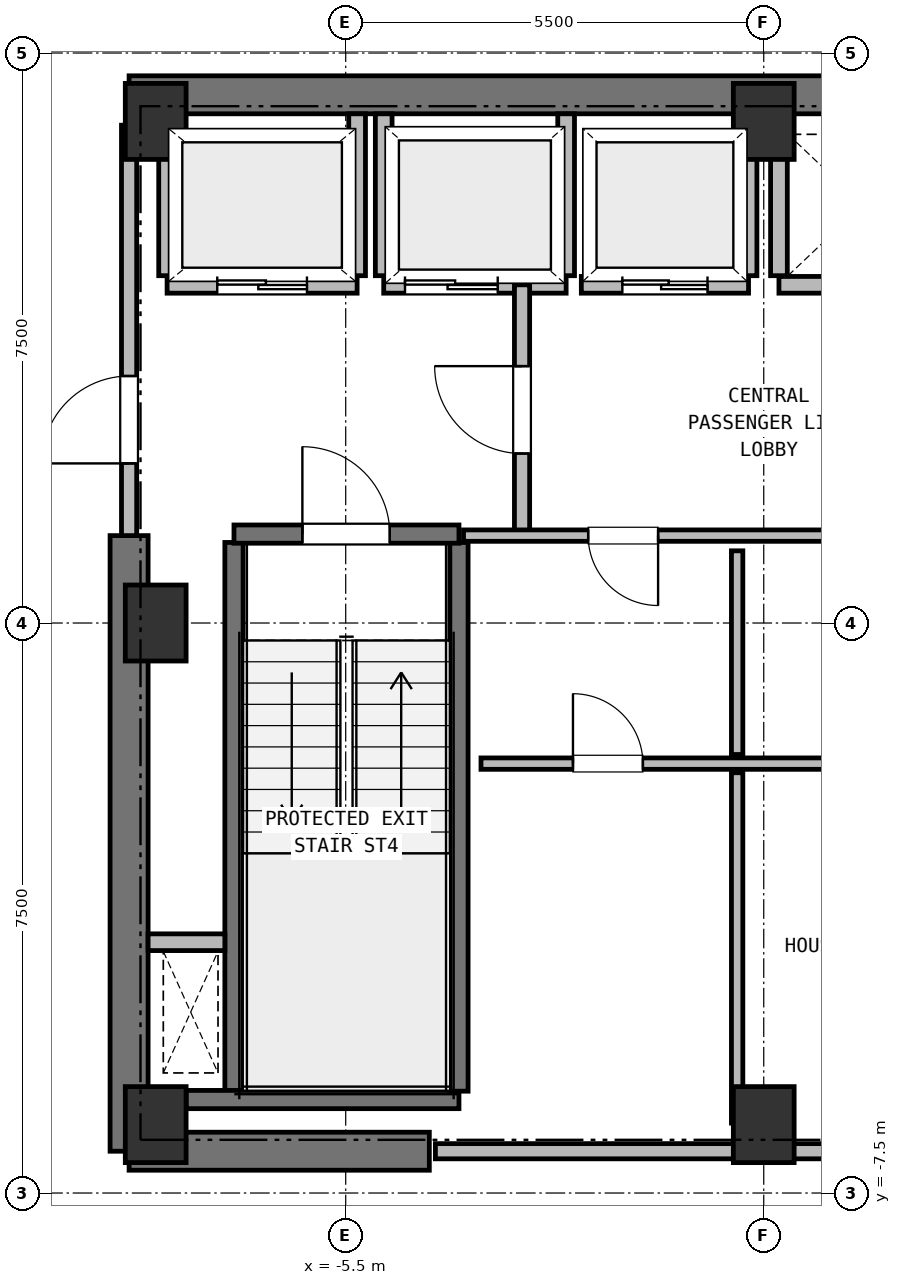
"""IFC4 building model, lengths in metres.
Left out: names, types, materials, properties, quantities, classifications, styles, units other than length and angle.
Written with IfcOpenShell. Run it as: python <this file> out.ifc"""

import sys

from ifc_helpers import new_model, si_unit, direction, frame, frame_2d, origin, origin_2d, place, context, subcontext, project, spatial, rectangle, extrude, element, fill, save


model = new_model("IFC4")
c1 = context("Model", 3, precision=1e-05, world=origin(), true_north=direction((0.0, 1.0)))
c2 = subcontext(c1, "Body", "Model", "MODEL_VIEW")
j1 = project(units=[si_unit("LENGTHUNIT", "METRE"), si_unit("PLANEANGLEUNIT", "RADIAN")], contexts=[c1])
p1 = place(None, origin())
s1 = spatial("IfcSite", under=j1, at=p1, CompositionType="ELEMENT")
p2 = place(p1, origin())
s2 = spatial("IfcBuilding", under=s1, at=p2, CompositionType="ELEMENT")
p3 = place(p2, frame((0.0, 0.0, 228.35)))
s3 = spatial("IfcBuildingStorey", under=s2, at=p3, CompositionType="ELEMENT", Elevation=228.35)
for number, where, z_axis, x_axis in (
    (1, (-8.0, -6.6, 0.0), (0.0, 0.0, 1.0), (1.0, 0.0, 0.0)),
    (2, (0.0, -6.6, 0.0), (0.0, 0.0, 1.0), (1.0, 0.0, 0.0)),
    (3, (0.0, 6.6, 0.0), (0.0, 0.0, 1.0), (1.0, 0.0, 0.0)),
    (4, (-8.0, 6.6, 0.0), (0.0, 0.0, 1.0), (1.0, 0.0, 0.0)),
    (5, (-8.0, 0.0, 0.0), (0.0, 0.0, 1.0), (1.0, 0.0, 0.0)),
):
    element("IfcColumn", number, at=place(p3, frame(where, z_axis=z_axis, x_axis=x_axis)), inside=s3, PredefinedType="COLUMN", context=c2, shape_type="SweptSolid", body=[
        extrude(rectangle(XDim=0.8, YDim=1.0, at=origin_2d()), origin(), (0.0, 0.0, 1.0), 3.8),
    ])
p4 = place(p3, frame((-8.35, 6.95, 0.0), z_axis=(0.0, 0.0, 1.0), x_axis=(1.0, 0.0, 0.0)))
e6 = element("IfcWall", 6, at=p4, inside=s3, PredefinedType="SHEAR", context=c2, shape_type="SweptSolid", body=[
    extrude(rectangle(XDim=16.7, YDim=0.5, at=frame_2d((8.35, 0.0))), origin(), (0.0, 0.0, 1.0), 3.55),
])
p5 = place(p3, frame((-8.35, -6.95, 0.0), z_axis=(0.0, 0.0, 1.0), x_axis=(1.0, 0.0, 0.0)))
e7 = element("IfcWall", 7, at=p5, inside=s3, PredefinedType="SHEAR", context=c2, shape_type="SweptSolid", body=[
    extrude(rectangle(XDim=3.95, YDim=0.5, at=frame_2d((1.975, 0.0))), origin(), (0.0, 0.0, 1.0), 3.55),
])
p6 = place(p3, frame((-8.35, -6.95, 0.0), z_axis=(0.0, 0.0, 1.0), x_axis=(0.0, 1.0, 0.0)))
e8 = element("IfcWall", 8, at=p6, inside=s3, PredefinedType="SHEAR", context=c2, shape_type="SweptSolid", body=[
    extrude(rectangle(XDim=8.1, YDim=0.5, at=frame_2d((4.05, 0.0))), origin(), (0.0, 0.0, 1.0), 3.55),
])
p7 = place(p3, frame((-8.102, -11.696, 0.0), z_axis=(0.0, 0.0, 1.0), x_axis=(-0.587801006747, 0.809005547859, 0.0)))
e9 = element("IfcWall", 9, at=p7, inside=s3, PredefinedType="SOLIDWALL", context=c2, shape_type="SweptSolid", body=[
    extrude(rectangle(XDim=9.4, YDim=0.36, at=frame_2d((4.7, 0.0))), origin(), (0.0, 0.0, 1.0), 3.23),
])
p8 = place(p7, frame((3.0, 0.0, 0.0)))
e10 = element("IfcOpeningElement", 10, at=p8, cuts=e9, PredefinedType="OPENING", context=c2, shape_type="SweptSolid", body=[
    extrude(rectangle(XDim=1.65, YDim=2.25, at=frame_2d((0.825, 1.125))), frame((0.0, 0.19, 0.0), z_axis=(0.0, -1.0, 0.0), x_axis=(1.0, 0.0, 0.0)), (0.0, 0.0, 1.0), 0.38),
])
p9 = place(p3, frame((-6.97, -6.16, 0.0), z_axis=(0.0, 0.0, 1.0), x_axis=(0.0, 1.0, 0.0)))
e11 = element("IfcWall", 11, at=p9, inside=s3, PredefinedType="SHEAR", context=c2, shape_type="SweptSolid", body=[
    extrude(rectangle(XDim=7.22, YDim=0.24, at=frame_2d((3.61, 0.0))), origin(), (0.0, 0.0, 1.0), 3.55),
])
p10 = place(p3, frame((-7.6, -6.27, 0.0), z_axis=(0.0, 0.0, 1.0), x_axis=(1.0, 0.0, 0.0)))
e12 = element("IfcWall", 12, at=p10, inside=s3, PredefinedType="SHEAR", context=c2, shape_type="SweptSolid", body=[
    extrude(rectangle(XDim=3.59, YDim=0.24, at=frame_2d((1.795, 0.0))), origin(), (0.0, 0.0, 1.0), 3.55),
])
p11 = place(p3, frame((-4.01, -6.16, 0.0), z_axis=(0.0, 0.0, 1.0), x_axis=(0.0, 1.0, 0.0)))
e13 = element("IfcWall", 13, at=p11, inside=s3, PredefinedType="SHEAR", context=c2, shape_type="SweptSolid", body=[
    extrude(rectangle(XDim=7.22, YDim=0.24, at=frame_2d((3.61, 0.0))), origin(), (0.0, 0.0, 1.0), 3.55),
])
p12 = place(p3, frame((-6.97, 1.17, 0.0), z_axis=(0.0, 0.0, 1.0), x_axis=(1.0, 0.0, 0.0)))
e14 = element("IfcWall", 14, at=p12, inside=s3, PredefinedType="SHEAR", context=c2, shape_type="SweptSolid", body=[
    extrude(rectangle(XDim=2.96, YDim=0.24, at=frame_2d((1.48, 0.0))), origin(), (0.0, 0.0, 1.0), 3.55),
])
p13 = place(p12, frame((0.9, 0.0, 0.0)))
e15 = element("IfcOpeningElement", 15, at=p13, cuts=e14, PredefinedType="OPENING", context=c2, shape_type="SweptSolid", body=[
    extrude(rectangle(XDim=1.15, YDim=2.15, at=frame_2d((0.575, 1.075))), frame((0.0, 0.13, 0.0), z_axis=(0.0, -1.0, 0.0), x_axis=(1.0, 0.0, 0.0)), (0.0, 0.0, 1.0), 0.26),
])
p14 = place(p3, frame((-8.1, -4.2, 0.0), z_axis=(0.0, 0.0, 1.0), x_axis=(1.0, 0.0, 0.0)))
e16 = element("IfcWall", 16, at=p14, inside=s3, PredefinedType="PARTITIONING", context=c2, shape_type="SweptSolid", body=[
    extrude(rectangle(XDim=1.01, YDim=0.22, at=frame_2d((0.505, 0.0))), origin(), (0.0, 0.0, 1.0), 3.55),
])
p15 = place(p3, frame((-7.85, 4.45, 0.0), z_axis=(0.0, 0.0, 1.0), x_axis=(1.0, 0.0, 0.0)))
e17 = element("IfcWall", 17, at=p15, inside=s3, PredefinedType="PARTITIONING", context=c2, shape_type="SweptSolid", body=[
    extrude(rectangle(XDim=2.5, YDim=0.22, at=frame_2d((1.25, 0.0))), origin(), (0.0, 0.0, 1.0), 3.55),
])
p16 = place(p15, frame((0.66, 0.0, 0.0)))
e18 = element("IfcOpeningElement", 18, at=p16, cuts=e17, PredefinedType="OPENING", context=c2, shape_type="SweptSolid", body=[
    extrude(rectangle(XDim=1.18, YDim=2.15, at=frame_2d((0.59, 1.075))), frame((0.0, 0.12, 0.0), z_axis=(0.0, -1.0, 0.0), x_axis=(1.0, 0.0, 0.0)), (0.0, 0.0, 1.0), 0.24),
])
p17 = place(p3, frame((-7.85, 4.57, 0.0), z_axis=(0.0, 0.0, 1.0), x_axis=(0.0, 1.0, 0.0)))
e19 = element("IfcWall", 19, at=p17, inside=s3, PredefinedType="PARTITIONING", context=c2, shape_type="SweptSolid", body=[
    extrude(rectangle(XDim=2.13, YDim=0.22, at=frame_2d((1.065, 0.0))), origin(), (0.0, 0.0, 1.0), 3.18),
])
p18 = place(p3, frame((-5.35, 4.57, 0.0), z_axis=(0.0, 0.0, 1.0), x_axis=(0.0, 1.0, 0.0)))
e20 = element("IfcWall", 20, at=p18, inside=s3, PredefinedType="PARTITIONING", context=c2, shape_type="SweptSolid", body=[
    extrude(rectangle(XDim=2.13, YDim=0.22, at=frame_2d((1.065, 0.0))), origin(), (0.0, 0.0, 1.0), 3.55),
])
p19 = place(p3, frame((-5.0, 4.45, 0.0), z_axis=(0.0, 0.0, 1.0), x_axis=(1.0, 0.0, 0.0)))
e21 = element("IfcWall", 21, at=p19, inside=s3, PredefinedType="PARTITIONING", context=c2, shape_type="SweptSolid", body=[
    extrude(rectangle(XDim=2.4, YDim=0.22, at=frame_2d((1.2, 0.0))), origin(), (0.0, 0.0, 1.0), 3.55),
])
p20 = place(p19, frame((0.28, 0.0, 0.0)))
e22 = element("IfcOpeningElement", 22, at=p20, cuts=e21, PredefinedType="OPENING", context=c2, shape_type="SweptSolid", body=[
    extrude(rectangle(XDim=1.22, YDim=2.15, at=frame_2d((0.61, 1.075))), frame((0.0, 0.12, 0.0), z_axis=(0.0, -1.0, 0.0), x_axis=(1.0, 0.0, 0.0)), (0.0, 0.0, 1.0), 0.24),
])
for number, where, z_axis, x_axis in (
    (23, (-5.0, 4.57, 0.0), (0.0, 0.0, 1.0), (0.0, 1.0, 0.0)),
    (24, (-2.6, 4.57, 0.0), (0.0, 0.0, 1.0), (0.0, 1.0, 0.0)),
):
    element("IfcWall", number, at=place(p3, frame(where, z_axis=z_axis, x_axis=x_axis)), inside=s3, PredefinedType="PARTITIONING", context=c2, shape_type="SweptSolid", body=[
        extrude(rectangle(XDim=2.13, YDim=0.22, at=frame_2d((1.065, 0.0))), origin(), (0.0, 0.0, 1.0), 3.55),
    ])
p21 = place(p3, frame((-2.4, 4.45, 0.0), z_axis=(0.0, 0.0, 1.0), x_axis=(1.0, 0.0, 0.0)))
e25 = element("IfcWall", 25, at=p21, inside=s3, PredefinedType="PARTITIONING", context=c2, shape_type="SweptSolid", body=[
    extrude(rectangle(XDim=2.2, YDim=0.22, at=frame_2d((1.1, 0.0))), origin(), (0.0, 0.0, 1.0), 3.55),
])
p22 = place(p21, frame((0.54, 0.0, 0.0)))
e26 = element("IfcOpeningElement", 26, at=p22, cuts=e25, PredefinedType="OPENING", context=c2, shape_type="SweptSolid", body=[
    extrude(rectangle(XDim=1.12, YDim=2.15, at=frame_2d((0.56, 1.075))), frame((0.0, 0.12, 0.0), z_axis=(0.0, -1.0, 0.0), x_axis=(1.0, 0.0, 0.0)), (0.0, 0.0, 1.0), 0.24),
])
p23 = place(p3, frame((-0.2, 4.57, 0.0), z_axis=(0.0, 0.0, 1.0), x_axis=(0.0, 1.0, 0.0)))
e27 = element("IfcWall", 27, at=p23, inside=s3, PredefinedType="PARTITIONING", context=c2, shape_type="SweptSolid", body=[
    extrude(rectangle(XDim=2.13, YDim=0.22, at=frame_2d((1.065, 0.0))), origin(), (0.0, 0.0, 1.0), 3.55),
])
p24 = place(p3, frame((0.2, 4.45, 0.0), z_axis=(0.0, 0.0, 1.0), x_axis=(1.0, 0.0, 0.0)))
e28 = element("IfcWall", 28, at=p24, inside=s3, PredefinedType="PARTITIONING", context=c2, shape_type="SweptSolid", body=[
    extrude(rectangle(XDim=2.2, YDim=0.22, at=frame_2d((1.1, 0.0))), origin(), (0.0, 0.0, 1.0), 3.55),
])
p25 = place(p3, frame((0.2, 4.57, 0.0), z_axis=(0.0, 0.0, 1.0), x_axis=(0.0, 1.0, 0.0)))
e29 = element("IfcWall", 29, at=p25, inside=s3, PredefinedType="PARTITIONING", context=c2, shape_type="SweptSolid", body=[
    extrude(rectangle(XDim=2.13, YDim=0.22, at=frame_2d((1.065, 0.0))), origin(), (0.0, 0.0, 1.0), 3.55),
])
p26 = place(p3, frame((-3.18, 1.15, 0.0), z_axis=(0.0, 0.0, 1.0), x_axis=(0.0, 1.0, 0.0)))
e30 = element("IfcWall", 30, at=p26, inside=s3, PredefinedType="PARTITIONING", context=c2, shape_type="SweptSolid", body=[
    extrude(rectangle(XDim=3.3, YDim=0.2, at=frame_2d((1.65, 0.0))), origin(), (0.0, 0.0, 1.0), 3.55),
])
p27 = place(p26, frame((1.08, 0.0, 0.0)))
e31 = element("IfcOpeningElement", 31, at=p27, cuts=e30, PredefinedType="OPENING", context=c2, shape_type="SweptSolid", body=[
    extrude(rectangle(XDim=1.15, YDim=2.15, at=frame_2d((0.575, 1.075))), frame((0.0, 0.11, 0.0), z_axis=(0.0, -1.0, 0.0), x_axis=(1.0, 0.0, 0.0)), (0.0, 0.0, 1.0), 0.22),
])
p28 = place(p3, frame((-8.35, 1.15, 0.0), z_axis=(0.0, 0.0, 1.0), x_axis=(0.0, 1.0, 0.0)))
e32 = element("IfcWall", 32, at=p28, inside=s3, PredefinedType="PARTITIONING", context=c2, shape_type="SweptSolid", body=[
    extrude(rectangle(XDim=5.4, YDim=0.2, at=frame_2d((2.7, 0.0))), origin(), (0.0, 0.0, 1.0), 3.55),
])
p29 = place(p28, frame((0.95, 0.0, 0.0)))
e33 = element("IfcOpeningElement", 33, at=p29, cuts=e32, PredefinedType="OPENING", context=c2, shape_type="SweptSolid", body=[
    extrude(rectangle(XDim=1.15, YDim=2.15, at=frame_2d((0.575, 1.075))), frame((0.0, 0.11, 0.0), z_axis=(0.0, -1.0, 0.0), x_axis=(1.0, 0.0, 0.0)), (0.0, 0.0, 1.0), 0.22),
])
p30 = place(p3, frame((3.95, 1.15, 0.0), z_axis=(0.0, 0.0, 1.0), x_axis=(-1.0, 0.0, 0.0)))
e34 = element("IfcWall", 34, at=p30, inside=s3, PredefinedType="PARTITIONING", context=c2, shape_type="SweptSolid", body=[
    extrude(rectangle(XDim=7.9, YDim=0.15, at=frame_2d((3.95, 0.0))), origin(), (0.0, 0.0, 1.0), 3.55),
])
p31 = place(p30, frame((5.34, 0.0, 0.0)))
e35 = element("IfcOpeningElement", 35, at=p31, cuts=e34, PredefinedType="OPENING", context=c2, shape_type="SweptSolid", body=[
    extrude(rectangle(XDim=0.92, YDim=2.05, at=frame_2d((0.46, 1.025))), frame((0.0, 0.085, 0.0), z_axis=(0.0, -1.0, 0.0), x_axis=(1.0, 0.0, 0.0)), (0.0, 0.0, 1.0), 0.17),
])
p32 = place(p30, frame((1.84, 0.0, 0.0)))
e36 = element("IfcOpeningElement", 36, at=p32, cuts=e34, PredefinedType="OPENING", context=c2, shape_type="SweptSolid", body=[
    extrude(rectangle(XDim=0.92, YDim=2.05, at=frame_2d((0.46, 1.025))), frame((0.0, 0.085, 0.0), z_axis=(0.0, -1.0, 0.0), x_axis=(1.0, 0.0, 0.0)), (0.0, 0.0, 1.0), 0.17),
])
p33 = place(p3, frame((-4.32, -6.95, 0.0), z_axis=(0.0, 0.0, 1.0), x_axis=(1.0, 0.0, 0.0)))
e37 = element("IfcWall", 37, at=p33, inside=s3, PredefinedType="PARTITIONING", context=c2, shape_type="SweptSolid", body=[
    extrude(rectangle(XDim=8.64, YDim=0.2, at=frame_2d((4.32, 0.0))), origin(), (0.0, 0.0, 1.0), 3.55),
])
p34 = place(p3, frame((-3.72, -1.85, 0.0), z_axis=(0.0, 0.0, 1.0), x_axis=(1.0, 0.0, 0.0)))
e38 = element("IfcWall", 38, at=p34, inside=s3, PredefinedType="PARTITIONING", context=c2, shape_type="SweptSolid", body=[
    extrude(rectangle(XDim=7.44, YDim=0.15, at=frame_2d((3.72, 0.0))), origin(), (0.0, 0.0, 1.0), 3.55),
])
p35 = place(p34, frame((1.21, 0.0, 0.0)))
e39 = element("IfcOpeningElement", 39, at=p35, cuts=e38, PredefinedType="OPENING", context=c2, shape_type="SweptSolid", body=[
    extrude(rectangle(XDim=0.92, YDim=2.05, at=frame_2d((0.46, 1.025))), frame((0.0, 0.085, 0.0), z_axis=(0.0, -1.0, 0.0), x_axis=(1.0, 0.0, 0.0)), (0.0, 0.0, 1.0), 0.17),
])
p36 = place(p34, frame((4.91, 0.0, 0.0)))
e40 = element("IfcOpeningElement", 40, at=p36, cuts=e38, PredefinedType="OPENING", context=c2, shape_type="SweptSolid", body=[
    extrude(rectangle(XDim=0.92, YDim=2.05, at=frame_2d((0.46, 1.025))), frame((0.0, 0.085, 0.0), z_axis=(0.0, -1.0, 0.0), x_axis=(1.0, 0.0, 0.0)), (0.0, 0.0, 1.0), 0.17),
])
p37 = place(p3, frame((-0.35, -6.58, 0.0), z_axis=(0.0, 0.0, 1.0), x_axis=(0.0, 1.0, 0.0)))
e41 = element("IfcWall", 41, at=p37, inside=s3, PredefinedType="PARTITIONING", context=c2, shape_type="SweptSolid", body=[
    extrude(rectangle(XDim=4.61, YDim=0.15, at=frame_2d((2.305, 0.0))), origin(), (0.0, 0.0, 1.0), 3.55),
])
p38 = place(p3, frame((-0.35, -1.73, 0.0), z_axis=(0.0, 0.0, 1.0), x_axis=(0.0, 1.0, 0.0)))
e42 = element("IfcWall", 42, at=p38, inside=s3, PredefinedType="PARTITIONING", context=c2, shape_type="SweptSolid", body=[
    extrude(rectangle(XDim=2.68, YDim=0.15, at=frame_2d((1.34, 0.0))), origin(), (0.0, 0.0, 1.0), 3.55),
])
p39 = place(p3, frame((-10.422, 7.309, 0.0), z_axis=(0.0, 0.0, 1.0), x_axis=(0.689960858356, 0.723846678473, 0.0)))
e43 = element("IfcWall", 43, at=p39, inside=s3, PredefinedType="PARTITIONING", context=c2, shape_type="SweptSolid", body=[
    extrude(rectangle(XDim=2.572, YDim=0.15, at=frame_2d((1.286, 0.0))), origin(), (0.0, 0.0, 1.0), 3.55),
])
p40 = place(p3, frame((-8.648, -9.151, 0.0), z_axis=(0.0, 0.0, 1.0), x_axis=(-0.693764562202, 0.720201869085, 0.0)))
e44 = element("IfcWall", 44, at=p40, inside=s3, PredefinedType="PARTITIONING", context=c2, shape_type="SweptSolid", body=[
    extrude(rectangle(XDim=2.558, YDim=0.15, at=frame_2d((1.279, 0.0))), origin(), (0.0, 0.0, 1.0), 3.23),
])
p41 = place(p13, origin())
e45 = element("IfcDoor", 45, at=p41, inside=s3, OperationType="SINGLE_SWING_LEFT", PredefinedType="DOOR", context=c2, shape_type="SweptSolid", body=[
    extrude(rectangle(XDim=1.15, YDim=2.15, at=frame_2d((0.575, 1.075))), frame((0.0, 0.025, 0.0), z_axis=(0.0, -1.0, 0.0), x_axis=(1.0, 0.0, 0.0)), (0.0, 0.0, 1.0), 0.05),
])
fill(e15, e45)
p42 = place(p16, origin())
e46 = element("IfcDoor", 46, at=p42, inside=s3, OperationType="DOUBLE_DOOR_SLIDING", PredefinedType="DOOR", context=c2, shape_type="SweptSolid", body=[
    extrude(rectangle(XDim=1.18, YDim=2.15, at=frame_2d((0.59, 1.075))), frame((0.0, 0.025, 0.0), z_axis=(0.0, -1.0, 0.0), x_axis=(1.0, 0.0, 0.0)), (0.0, 0.0, 1.0), 0.05),
])
fill(e18, e46)
p43 = place(p20, origin())
e47 = element("IfcDoor", 47, at=p43, inside=s3, OperationType="DOUBLE_DOOR_SLIDING", PredefinedType="DOOR", context=c2, shape_type="SweptSolid", body=[
    extrude(rectangle(XDim=1.22, YDim=2.15, at=frame_2d((0.61, 1.075))), frame((0.0, 0.025, 0.0), z_axis=(0.0, -1.0, 0.0), x_axis=(1.0, 0.0, 0.0)), (0.0, 0.0, 1.0), 0.05),
])
fill(e22, e47)
p44 = place(p22, origin())
e48 = element("IfcDoor", 48, at=p44, inside=s3, OperationType="DOUBLE_DOOR_SLIDING", PredefinedType="DOOR", context=c2, shape_type="SweptSolid", body=[
    extrude(rectangle(XDim=1.12, YDim=2.15, at=frame_2d((0.56, 1.075))), frame((0.0, 0.025, 0.0), z_axis=(0.0, -1.0, 0.0), x_axis=(1.0, 0.0, 0.0)), (0.0, 0.0, 1.0), 0.05),
])
fill(e26, e48)
p45 = place(p27, origin())
e49 = element("IfcDoor", 49, at=p45, inside=s3, OperationType="SINGLE_SWING_RIGHT", PredefinedType="DOOR", context=c2, shape_type="SweptSolid", body=[
    extrude(rectangle(XDim=1.15, YDim=2.15, at=frame_2d((0.575, 1.075))), frame((0.0, 0.025, 0.0), z_axis=(0.0, -1.0, 0.0), x_axis=(1.0, 0.0, 0.0)), (0.0, 0.0, 1.0), 0.05),
])
fill(e31, e49)
p46 = place(p29, origin())
e50 = element("IfcDoor", 50, at=p46, inside=s3, OperationType="SINGLE_SWING_LEFT", PredefinedType="DOOR", context=c2, shape_type="SweptSolid", body=[
    extrude(rectangle(XDim=1.15, YDim=2.15, at=frame_2d((0.575, 1.075))), frame((0.0, 0.025, 0.0), z_axis=(0.0, -1.0, 0.0), x_axis=(1.0, 0.0, 0.0)), (0.0, 0.0, 1.0), 0.05),
])
fill(e33, e50)
p47 = place(p31, origin())
e51 = element("IfcDoor", 51, at=p47, inside=s3, OperationType="SINGLE_SWING_LEFT", PredefinedType="DOOR", context=c2, shape_type="SweptSolid", body=[
    extrude(rectangle(XDim=0.92, YDim=2.05, at=frame_2d((0.46, 1.025))), frame((0.0, 0.025, 0.0), z_axis=(0.0, -1.0, 0.0), x_axis=(1.0, 0.0, 0.0)), (0.0, 0.0, 1.0), 0.05),
])
fill(e35, e51)
p48 = place(p35, origin())
e52 = element("IfcDoor", 52, at=p48, inside=s3, OperationType="SINGLE_SWING_LEFT", PredefinedType="DOOR", context=c2, shape_type="SweptSolid", body=[
    extrude(rectangle(XDim=0.92, YDim=2.05, at=frame_2d((0.46, 1.025))), frame((0.0, 0.025, 0.0), z_axis=(0.0, -1.0, 0.0), x_axis=(1.0, 0.0, 0.0)), (0.0, 0.0, 1.0), 0.05),
])
fill(e39, e52)
save(model, sys.argv[1])
